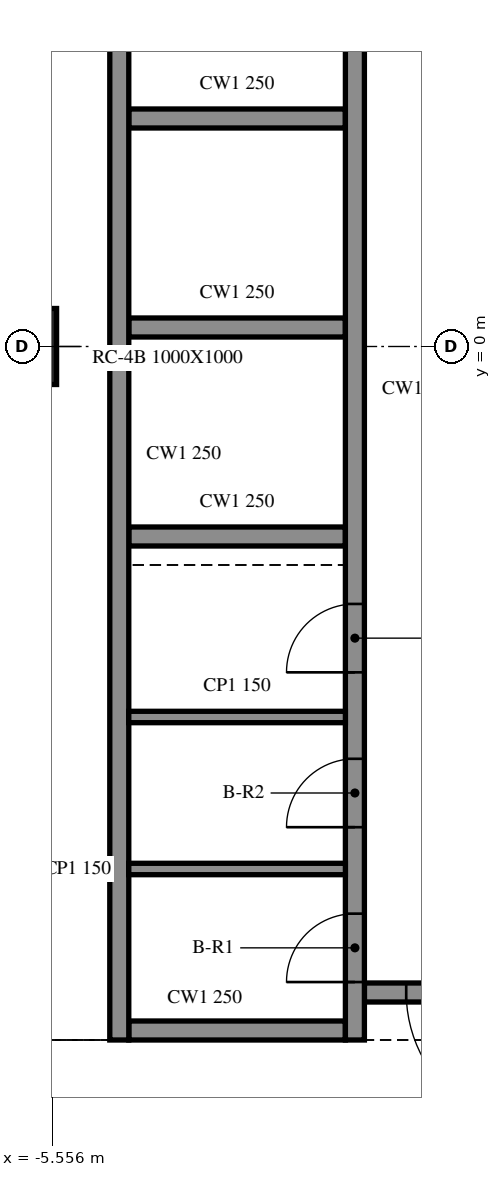
"""IFC4 building model, lengths in metres.
Left out: names, types, materials, properties, quantities, classifications, styles, units other than length and angle.
Written with IfcOpenShell. Run it as: python <this file> out.ifc"""

import sys

from ifc_helpers import new_model, si_unit, direction, frame, frame_2d, origin, origin_2d, place, context, subcontext, project, spatial, rectangle, extrude, element, fill, save


model = new_model("IFC4")
c1 = context("Model", 3, precision=1e-05, world=origin(), true_north=direction((0.0, 1.0)))
c2 = subcontext(c1, "Body", "Model", "MODEL_VIEW")
j1 = project(units=[si_unit("LENGTHUNIT", "METRE"), si_unit("PLANEANGLEUNIT", "RADIAN")], contexts=[c1])
p1 = place(None, origin())
s1 = spatial("IfcSite", under=j1, at=p1, CompositionType="ELEMENT")
p2 = place(p1, origin())
s2 = spatial("IfcBuilding", under=s1, at=p2, CompositionType="ELEMENT")
p3 = place(p2, frame((0.0, 0.0, 259.0)))
s3 = spatial("IfcBuildingStorey", under=s2, at=p3, CompositionType="ELEMENT", Elevation=259.0)
p4 = place(p3, frame((-6.0, 0.0, -0.4), z_axis=(0.0, 0.0, 1.0), x_axis=(1.0, 0.0, 0.0)))
e1 = element("IfcColumn", 1, at=p4, inside=s3, PredefinedType="COLUMN", context=c2, shape_type="SweptSolid", body=[
    extrude(rectangle(XDim=1.0, YDim=1.0, at=origin_2d()), origin(), (0.0, 0.0, 1.0), 4.36),
])
p5 = place(p3, frame((-4.675, 15.125, 0.0), z_axis=(0.0, 0.0, 1.0), x_axis=(0.0, -1.0, 0.0)))
e2 = element("IfcWall", 2, at=p5, inside=s3, PredefinedType="SOLIDWALL", context=c2, shape_type="SweptSolid", body=[
    extrude(rectangle(XDim=24.25, YDim=0.25, at=frame_2d((12.125, 0.0))), origin(), (0.0, 0.0, 1.0), 3.96),
])
p6 = place(p3, frame((-1.7, -9.0, 0.0), z_axis=(0.0, 0.0, 1.0), x_axis=(-1.0, 0.0, 0.0)))
e3 = element("IfcWall", 3, at=p6, inside=s3, PredefinedType="SOLIDWALL", context=c2, shape_type="SweptSolid", body=[
    extrude(rectangle(XDim=2.85, YDim=0.25, at=frame_2d((1.425, 0.0))), origin(), (0.0, 0.0, 1.0), 3.96),
])
p7 = place(p3, frame((1.45, -8.5, 0.0), z_axis=(0.0, 0.0, 1.0), x_axis=(-1.0, 0.0, 0.0)))
e4 = element("IfcWall", 4, at=p7, inside=s3, PredefinedType="SOLIDWALL", context=c2, shape_type="SweptSolid", body=[
    extrude(rectangle(XDim=2.9, YDim=0.25, at=frame_2d((1.45, 0.0))), origin(), (0.0, 0.0, 1.0), 3.96),
])
p8 = place(p7, frame((0.55, 0.0, 0.0)))
e5 = element("IfcOpeningElement", 5, at=p8, cuts=e4, PredefinedType="OPENING", context=c2, shape_type="SweptSolid", body=[
    extrude(rectangle(XDim=1.8, YDim=2.1, at=frame_2d((0.9, 1.05))), frame((0.0, 0.135, 0.0), z_axis=(0.0, -1.0, 0.0), x_axis=(1.0, 0.0, 0.0)), (0.0, 0.0, 1.0), 0.27),
])
p9 = place(p3, frame((-1.575, -9.125, 0.0), z_axis=(0.0, 0.0, 1.0), x_axis=(0.0, 1.0, 0.0)))
e6 = element("IfcWall", 6, at=p9, inside=s3, PredefinedType="SOLIDWALL", context=c2, shape_type="SweptSolid", body=[
    extrude(rectangle(XDim=24.0, YDim=0.25, at=frame_2d((12.0, 0.0))), origin(), (0.0, 0.0, 1.0), 3.96),
])
p10 = place(p9, frame((0.762, 0.0, 0.0)))
e7 = element("IfcOpeningElement", 7, at=p10, cuts=e6, PredefinedType="OPENING", context=c2, shape_type="SweptSolid", body=[
    extrude(rectangle(XDim=0.9, YDim=2.1, at=frame_2d((0.45, 1.05))), frame((0.0, 0.135, 0.0), z_axis=(0.0, -1.0, 0.0), x_axis=(1.0, 0.0, 0.0)), (0.0, 0.0, 1.0), 0.27),
])
p11 = place(p9, frame((2.8, 0.0, 0.0)))
e8 = element("IfcOpeningElement", 8, at=p11, cuts=e6, PredefinedType="OPENING", context=c2, shape_type="SweptSolid", body=[
    extrude(rectangle(XDim=0.9, YDim=2.1, at=frame_2d((0.45, 1.05))), frame((0.0, 0.135, 0.0), z_axis=(0.0, -1.0, 0.0), x_axis=(1.0, 0.0, 0.0)), (0.0, 0.0, 1.0), 0.27),
])
p12 = place(p9, frame((4.837, 0.0, 0.0)))
e9 = element("IfcOpeningElement", 9, at=p12, cuts=e6, PredefinedType="OPENING", context=c2, shape_type="SweptSolid", body=[
    extrude(rectangle(XDim=0.9, YDim=2.1, at=frame_2d((0.45, 1.05))), frame((0.0, 0.135, 0.0), z_axis=(0.0, -1.0, 0.0), x_axis=(1.0, 0.0, 0.0)), (0.0, 0.0, 1.0), 0.27),
])
p13 = place(p9, frame((19.512, 0.0, 0.0)))
e10 = element("IfcOpeningElement", 10, at=p13, cuts=e6, PredefinedType="OPENING", context=c2, shape_type="SweptSolid", body=[
    extrude(rectangle(XDim=0.9, YDim=2.1, at=frame_2d((0.45, 1.05))), frame((0.0, 0.135, 0.0), z_axis=(0.0, -1.0, 0.0), x_axis=(1.0, 0.0, 0.0)), (0.0, 0.0, 1.0), 0.27),
])
p14 = place(p9, frame((22.587, 0.0, 0.0)))
e11 = element("IfcOpeningElement", 11, at=p14, cuts=e6, PredefinedType="OPENING", context=c2, shape_type="SweptSolid", body=[
    extrude(rectangle(XDim=0.9, YDim=2.1, at=frame_2d((0.45, 1.05))), frame((0.0, 0.135, 0.0), z_axis=(0.0, -1.0, 0.0), x_axis=(1.0, 0.0, 0.0)), (0.0, 0.0, 1.0), 0.27),
])
for number, where, z_axis, x_axis in (
    (12, (-4.55, -2.5, 0.0), (0.0, 0.0, 1.0), (1.0, 0.0, 0.0)),
    (13, (-4.55, 0.25, 0.0), (0.0, 0.0, 1.0), (1.0, 0.0, 0.0)),
    (14, (-4.55, 3.0, 0.0), (0.0, 0.0, 1.0), (1.0, 0.0, 0.0)),
):
    element("IfcWall", number, at=place(p3, frame(where, z_axis=z_axis, x_axis=x_axis)), inside=s3, PredefinedType="SOLIDWALL", context=c2, shape_type="SweptSolid", body=[
        extrude(rectangle(XDim=2.85, YDim=0.25, at=frame_2d((1.425, 0.0))), origin(), (0.0, 0.0, 1.0), 3.96),
    ])
for number, where, z_axis, x_axis in (
    (15, (-4.55, -6.875, 0.0), (0.0, 0.0, 1.0), (1.0, 0.0, 0.0)),
    (16, (-4.55, -4.875, 0.0), (0.0, 0.0, 1.0), (1.0, 0.0, 0.0)),
):
    element("IfcWall", number, at=place(p3, frame(where, z_axis=z_axis, x_axis=x_axis)), inside=s3, PredefinedType="PARTITIONING", context=c2, shape_type="SweptSolid", body=[
        extrude(rectangle(XDim=2.85, YDim=0.15, at=frame_2d((1.425, 0.0))), origin(), (0.0, 0.0, 1.0), 3.96),
    ])
p15 = place(p8, origin())
e17 = element("IfcDoor", 17, at=p15, inside=s3, OperationType="DOUBLE_DOOR_SINGLE_SWING", PredefinedType="DOOR", context=c2, shape_type="SweptSolid", body=[
    extrude(rectangle(XDim=1.8, YDim=2.1, at=frame_2d((0.9, 1.05))), frame((0.0, 0.025, 0.0), z_axis=(0.0, -1.0, 0.0), x_axis=(1.0, 0.0, 0.0)), (0.0, 0.0, 1.0), 0.05),
])
fill(e5, e17)
p16 = place(p10, origin())
e18 = element("IfcDoor", 18, at=p16, inside=s3, OperationType="SINGLE_SWING_LEFT", PredefinedType="DOOR", context=c2, shape_type="SweptSolid", body=[
    extrude(rectangle(XDim=0.9, YDim=2.1, at=frame_2d((0.45, 1.05))), frame((0.0, 0.025, 0.0), z_axis=(0.0, -1.0, 0.0), x_axis=(1.0, 0.0, 0.0)), (0.0, 0.0, 1.0), 0.05),
])
fill(e7, e18)
p17 = place(p11, origin())
e19 = element("IfcDoor", 19, at=p17, inside=s3, OperationType="SINGLE_SWING_RIGHT", PredefinedType="DOOR", context=c2, shape_type="SweptSolid", body=[
    extrude(rectangle(XDim=0.9, YDim=2.1, at=frame_2d((0.45, 1.05))), frame((0.0, 0.025, 0.0), z_axis=(0.0, -1.0, 0.0), x_axis=(1.0, 0.0, 0.0)), (0.0, 0.0, 1.0), 0.05),
])
fill(e8, e19)
p18 = place(p12, origin())
e20 = element("IfcDoor", 20, at=p18, inside=s3, OperationType="SINGLE_SWING_LEFT", PredefinedType="DOOR", context=c2, shape_type="SweptSolid", body=[
    extrude(rectangle(XDim=0.9, YDim=2.1, at=frame_2d((0.45, 1.05))), frame((0.0, 0.025, 0.0), z_axis=(0.0, -1.0, 0.0), x_axis=(1.0, 0.0, 0.0)), (0.0, 0.0, 1.0), 0.05),
])
fill(e9, e20)
save(model, sys.argv[1])
